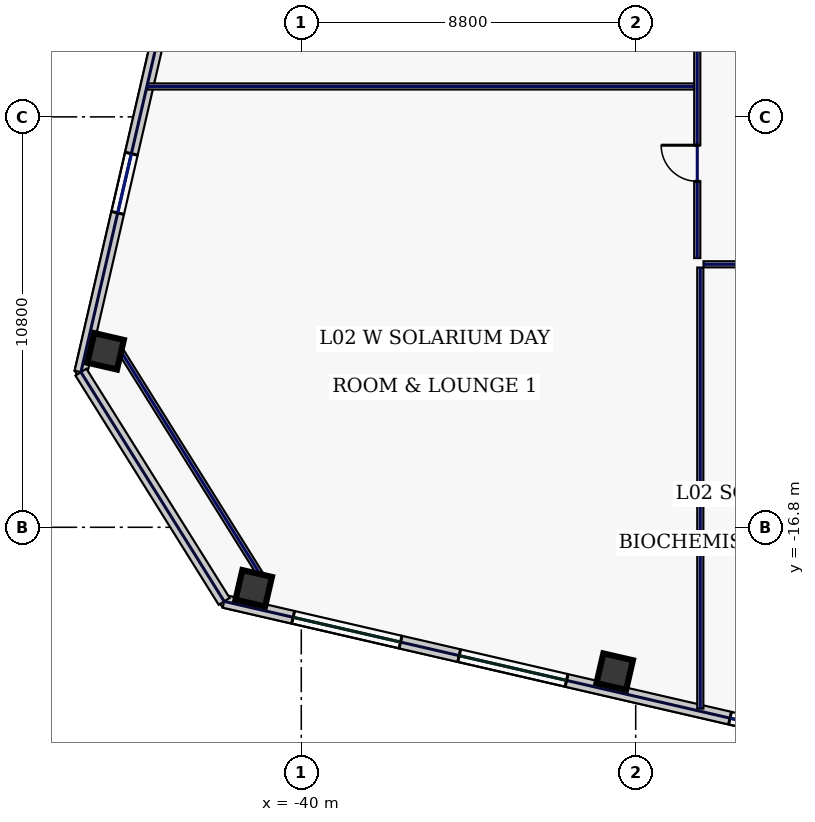
"""IFC4 building model, lengths in metres.
Left out: names, types, materials, properties, quantities, classifications, styles, units other than length and angle.
Written with IfcOpenShell. Run it as: python <this file> out.ifc"""

import sys

from ifc_helpers import new_model, si_unit, direction, frame, frame_2d, origin, origin_2d, place, context, subcontext, project, spatial, rectangle, hollow_rectangle, extrude, element, fill, save


model = new_model("IFC4")
c1 = context("Model", 3, precision=1e-05, world=origin(), true_north=direction((0.0, 1.0)))
c2 = subcontext(c1, "Body", "Model", "MODEL_VIEW")
j1 = project(units=[si_unit("LENGTHUNIT", "METRE"), si_unit("PLANEANGLEUNIT", "RADIAN")], contexts=[c1])
p1 = place(None, origin())
s1 = spatial("IfcSite", under=j1, at=p1, CompositionType="ELEMENT")
p2 = place(p1, origin())
s2 = spatial("IfcBuilding", under=s1, at=p2, CompositionType="ELEMENT")
p3 = place(p2, frame((0.0, 0.0, 13.4)))
s3 = spatial("IfcBuildingStorey", under=s2, at=p3, CompositionType="ELEMENT", Elevation=13.4)
for number, where, z_axis, x_axis in (
    (1, (-41.251, -18.406, 0.0), (0.0, 0.0, 1.0), (0.974, -0.225, 0.0)),
    (2, (-31.752, -20.599, 0.0), (0.0, 0.0, 1.0), (0.974, -0.225, 0.0)),
    (3, (-45.148, -12.169, 0.0), (0.0, 0.0, 1.0), (0.974, -0.225, 0.0)),
):
    element("IfcColumn", number, at=place(p3, frame(where, z_axis=z_axis, x_axis=x_axis)), inside=s3, PredefinedType="COLUMN", context=c2, shape_type="SweptSolid", body=[
        extrude(hollow_rectangle(XDim=0.8, YDim=0.8, WallThickness=0.036, at=origin_2d()), origin(), (0.0, 0.0, 1.0), 4.7),
    ])
p4 = place(p3, frame((-42.029, -18.75, 0.0), z_axis=(0.0, 0.0, 1.0), x_axis=(0.97436993772, -0.224951604723, 0.0)))
e4 = element("IfcWall", 4, at=p4, inside=s3, PredefinedType="STANDARD", context=c2, shape_type="SweptSolid", body=[
    extrude(rectangle(XDim=22.651, YDim=0.34, at=frame_2d((11.326, 0.0))), origin(), (0.0, 0.0, 1.0), 4.7),
])
p5 = place(p4, frame((1.862, 0.0, 0.85)))
e5 = element("IfcOpeningElement", 5, at=p5, cuts=e4, PredefinedType="OPENING", context=c2, shape_type="SweptSolid", body=[
    extrude(rectangle(XDim=2.9, YDim=2.3, at=frame_2d((1.45, 1.15))), frame((0.0, 0.18, 0.0), z_axis=(0.0, -1.0, 0.0), x_axis=(1.0, 0.0, 0.0)), (0.0, 0.0, 1.0), 0.36),
])
p6 = place(p4, frame((6.346, 0.0, 0.85)))
e6 = element("IfcOpeningElement", 6, at=p6, cuts=e4, PredefinedType="OPENING", context=c2, shape_type="SweptSolid", body=[
    extrude(rectangle(XDim=2.9, YDim=2.3, at=frame_2d((1.45, 1.15))), frame((0.0, 0.18, 0.0), z_axis=(0.0, -1.0, 0.0), x_axis=(1.0, 0.0, 0.0)), (0.0, 0.0, 1.0), 0.36),
])
p7 = place(p4, frame((13.661, 0.0, 0.85)))
e7 = element("IfcOpeningElement", 7, at=p7, cuts=e4, PredefinedType="OPENING", context=c2, shape_type="SweptSolid", body=[
    extrude(rectangle(XDim=0.85, YDim=1.85, at=frame_2d((0.425, 0.925))), frame((0.0, 0.18, 0.0), z_axis=(0.0, -1.0, 0.0), x_axis=(1.0, 0.0, 0.0)), (0.0, 0.0, 1.0), 0.36),
])
p8 = place(p4, frame((16.095, 0.0, 0.85)))
e8 = element("IfcOpeningElement", 8, at=p8, cuts=e4, PredefinedType="OPENING", context=c2, shape_type="SweptSolid", body=[
    extrude(rectangle(XDim=0.85, YDim=1.85, at=frame_2d((0.425, 0.925))), frame((0.0, 0.18, 0.0), z_axis=(0.0, -1.0, 0.0), x_axis=(1.0, 0.0, 0.0)), (0.0, 0.0, 1.0), 0.36),
])
p9 = place(p3, frame((-36.62, 27.037, 0.0), z_axis=(0.0, 0.0, 1.0), x_axis=(-0.224951280646, -0.974370012539, 0.0)))
e9 = element("IfcWall", 9, at=p9, inside=s3, PredefinedType="STANDARD", context=c2, shape_type="SweptSolid", body=[
    extrude(rectangle(XDim=40.8, YDim=0.34, at=frame_2d((20.4, 0.0))), origin(), (0.0, 0.0, 1.0), 4.7),
])
p10 = place(p9, frame((4.3, 0.0, 0.58)))
e10 = element("IfcOpeningElement", 10, at=p10, cuts=e9, PredefinedType="OPENING", context=c2, shape_type="SweptSolid", body=[
    extrude(rectangle(XDim=1.6, YDim=2.3, at=frame_2d((0.8, 1.15))), frame((0.0, 0.18, 0.0), z_axis=(0.0, -1.0, 0.0), x_axis=(1.0, 0.0, 0.0)), (0.0, 0.0, 1.0), 0.36),
])
p11 = place(p9, frame((14.5, 0.0, 0.58)))
e11 = element("IfcOpeningElement", 11, at=p11, cuts=e9, PredefinedType="OPENING", context=c2, shape_type="SweptSolid", body=[
    extrude(rectangle(XDim=1.6, YDim=2.3, at=frame_2d((0.8, 1.15))), frame((0.0, 0.18, 0.0), z_axis=(0.0, -1.0, 0.0), x_axis=(1.0, 0.0, 0.0)), (0.0, 0.0, 1.0), 0.36),
])
p12 = place(p9, frame((24.7, 0.0, 0.58)))
e12 = element("IfcOpeningElement", 12, at=p12, cuts=e9, PredefinedType="OPENING", context=c2, shape_type="SweptSolid", body=[
    extrude(rectangle(XDim=1.6, YDim=2.3, at=frame_2d((0.8, 1.15))), frame((0.0, 0.18, 0.0), z_axis=(0.0, -1.0, 0.0), x_axis=(1.0, 0.0, 0.0)), (0.0, 0.0, 1.0), 0.36),
])
p13 = place(p9, frame((34.9, 0.0, 0.58)))
e13 = element("IfcOpeningElement", 13, at=p13, cuts=e9, PredefinedType="OPENING", context=c2, shape_type="SweptSolid", body=[
    extrude(rectangle(XDim=1.6, YDim=2.3, at=frame_2d((0.8, 1.15))), frame((0.0, 0.18, 0.0), z_axis=(0.0, -1.0, 0.0), x_axis=(1.0, 0.0, 0.0)), (0.0, 0.0, 1.0), 0.36),
])
p14 = place(p3, frame((-45.798, -12.717, 0.0), z_axis=(0.0, 0.0, 1.0), x_axis=(0.529906387556, -0.848056142261, 0.0)))
e14 = element("IfcWall", 14, at=p14, inside=s3, PredefinedType="STANDARD", context=c2, shape_type="SweptSolid", body=[
    extrude(rectangle(XDim=7.114, YDim=0.34, at=frame_2d((3.557, 0.0))), origin(), (0.0, 0.0, 1.0), 4.7),
])
p15 = place(p3, frame((-44.86, -11.989, 0.0), z_axis=(0.0, 0.0, 1.0), x_axis=(0.52991239767, -0.848052386823, 0.0)))
e15 = element("IfcWall", 15, at=p15, inside=s3, PredefinedType="PARTITIONING", context=c2, shape_type="SweptSolid", body=[
    extrude(rectangle(XDim=7.354, YDim=0.16, at=frame_2d((3.677, 0.0))), origin(), (0.0, 0.0, 1.0), 4.7),
])
p16 = place(p3, frame((-29.58, -9.715, 0.0), z_axis=(0.0, 0.0, 1.0), x_axis=(0.0, 1.0, 0.0)))
e16 = element("IfcWall", 16, at=p16, inside=s3, PredefinedType="PARTITIONING", context=c2, shape_type="SweptSolid", body=[
    extrude(rectangle(XDim=19.43, YDim=0.16, at=frame_2d((9.715, 0.0))), origin(), (0.0, 0.0, 1.0), 4.7),
])
p17 = place(p16, frame((2.019, 0.0, 0.0)))
e17 = element("IfcOpeningElement", 17, at=p17, cuts=e16, PredefinedType="OPENING", context=c2, shape_type="SweptSolid", body=[
    extrude(rectangle(XDim=0.95, YDim=2.2, at=frame_2d((0.475, 1.1))), frame((0.0, 0.09, 0.0), z_axis=(0.0, -1.0, 0.0), x_axis=(1.0, 0.0, 0.0)), (0.0, 0.0, 1.0), 0.18),
])
p18 = place(p16, frame((6.725, 0.0, 0.0)))
e18 = element("IfcOpeningElement", 18, at=p18, cuts=e16, PredefinedType="OPENING", context=c2, shape_type="SweptSolid", body=[
    extrude(rectangle(XDim=0.95, YDim=2.2, at=frame_2d((0.475, 1.1))), frame((0.0, 0.09, 0.0), z_axis=(0.0, -1.0, 0.0), x_axis=(1.0, 0.0, 0.0)), (0.0, 0.0, 1.0), 0.18),
])
p19 = place(p16, frame((11.925, 0.0, 0.0)))
e19 = element("IfcOpeningElement", 19, at=p19, cuts=e16, PredefinedType="OPENING", context=c2, shape_type="SweptSolid", body=[
    extrude(rectangle(XDim=0.95, YDim=2.2, at=frame_2d((0.475, 1.1))), frame((0.0, 0.09, 0.0), z_axis=(0.0, -1.0, 0.0), x_axis=(1.0, 0.0, 0.0)), (0.0, 0.0, 1.0), 0.18),
])
p20 = place(p16, frame((16.631, 0.0, 0.0)))
e20 = element("IfcOpeningElement", 20, at=p20, cuts=e16, PredefinedType="OPENING", context=c2, shape_type="SweptSolid", body=[
    extrude(rectangle(XDim=0.95, YDim=2.2, at=frame_2d((0.475, 1.1))), frame((0.0, 0.09, 0.0), z_axis=(0.0, -1.0, 0.0), x_axis=(1.0, 0.0, 0.0)), (0.0, 0.0, 1.0), 0.18),
])
p21 = place(p3, frame((-6.915, -9.88, 0.0), z_axis=(0.0, 0.0, 1.0), x_axis=(-1.0, 0.0, 0.0)))
e21 = element("IfcWall", 21, at=p21, inside=s3, PredefinedType="PARTITIONING", context=c2, shape_type="SweptSolid", body=[
    extrude(rectangle(XDim=22.5, YDim=0.16, at=frame_2d((11.25, 0.0))), origin(), (0.0, 0.0, 1.0), 4.7),
])
p22 = place(p21, frame((19.676, 0.0, 0.0)))
e22 = element("IfcOpeningElement", 22, at=p22, cuts=e21, PredefinedType="OPENING", context=c2, shape_type="SweptSolid", body=[
    extrude(rectangle(XDim=0.95, YDim=2.2, at=frame_2d((0.475, 1.1))), frame((0.0, 0.09, 0.0), z_axis=(0.0, -1.0, 0.0), x_axis=(1.0, 0.0, 0.0)), (0.0, 0.0, 1.0), 0.18),
])
p23 = place(p21, frame((14.22, 0.0, 0.0)))
e23 = element("IfcOpeningElement", 23, at=p23, cuts=e21, PredefinedType="OPENING", context=c2, shape_type="SweptSolid", body=[
    extrude(rectangle(XDim=0.95, YDim=2.2, at=frame_2d((0.475, 1.1))), frame((0.0, 0.09, 0.0), z_axis=(0.0, -1.0, 0.0), x_axis=(1.0, 0.0, 0.0)), (0.0, 0.0, 1.0), 0.18),
])
p24 = place(p21, frame((7.495, 0.0, 0.0)))
e24 = element("IfcOpeningElement", 24, at=p24, cuts=e21, PredefinedType="OPENING", context=c2, shape_type="SweptSolid", body=[
    extrude(rectangle(XDim=0.95, YDim=2.2, at=frame_2d((0.475, 1.1))), frame((0.0, 0.09, 0.0), z_axis=(0.0, -1.0, 0.0), x_axis=(1.0, 0.0, 0.0)), (0.0, 0.0, 1.0), 0.18),
])
p25 = place(p3, frame((-29.5, -21.571, 0.0), z_axis=(0.0, 0.0, 1.0), x_axis=(0.0, 1.0, 0.0)))
e25 = element("IfcWall", 25, at=p25, inside=s3, PredefinedType="PARTITIONING", context=c2, shape_type="SweptSolid", body=[
    extrude(rectangle(XDim=11.605, YDim=0.16, at=frame_2d((5.803, 0.0))), origin(), (0.0, 0.0, 1.0), 4.7),
])
p26 = place(p3, frame((-44.042, -5.2, 0.0), z_axis=(0.0, 0.0, 1.0), x_axis=(1.0, 0.0, 0.0)))
e26 = element("IfcWall", 26, at=p26, inside=s3, PredefinedType="PARTITIONING", context=c2, shape_type="SweptSolid", body=[
    extrude(rectangle(XDim=14.377, YDim=0.16, at=frame_2d((7.188, 0.0))), origin(), (0.0, 0.0, 1.0), 4.7),
])
p27 = place(p5, origin())
e27 = element("IfcWindow", 27, at=p27, inside=s3, PartitioningType="SINGLE_PANEL", PredefinedType="WINDOW", context=c2, shape_type="SweptSolid", body=[
    extrude(rectangle(XDim=2.9, YDim=2.3, at=frame_2d((1.45, 1.15))), frame((0.0, 0.03, 0.0), z_axis=(0.0, -1.0, 0.0), x_axis=(1.0, 0.0, 0.0)), (0.0, 0.0, 1.0), 0.06),
])
fill(e5, e27)
p28 = place(p6, origin())
e28 = element("IfcWindow", 28, at=p28, inside=s3, PartitioningType="SINGLE_PANEL", PredefinedType="WINDOW", context=c2, shape_type="SweptSolid", body=[
    extrude(rectangle(XDim=2.9, YDim=2.3, at=frame_2d((1.45, 1.15))), frame((0.0, 0.03, 0.0), z_axis=(0.0, -1.0, 0.0), x_axis=(1.0, 0.0, 0.0)), (0.0, 0.0, 1.0), 0.06),
])
fill(e6, e28)
p29 = place(p7, origin())
e29 = element("IfcWindow", 29, at=p29, inside=s3, PartitioningType="SINGLE_PANEL", PredefinedType="WINDOW", context=c2, shape_type="SweptSolid", body=[
    extrude(rectangle(XDim=0.85, YDim=1.85, at=frame_2d((0.425, 0.925))), frame((0.0, 0.03, 0.0), z_axis=(0.0, -1.0, 0.0), x_axis=(1.0, 0.0, 0.0)), (0.0, 0.0, 1.0), 0.06),
])
fill(e7, e29)
p30 = place(p13, origin())
e30 = element("IfcWindow", 30, at=p30, inside=s3, PartitioningType="SINGLE_PANEL", PredefinedType="WINDOW", context=c2, shape_type="SweptSolid", body=[
    extrude(rectangle(XDim=1.6, YDim=2.3, at=frame_2d((0.8, 1.15))), frame((0.0, 0.03, 0.0), z_axis=(0.0, -1.0, 0.0), x_axis=(1.0, 0.0, 0.0)), (0.0, 0.0, 1.0), 0.06),
])
fill(e13, e30)
p31 = place(p17, origin())
e31 = element("IfcDoor", 31, at=p31, inside=s3, OperationType="SINGLE_SWING_RIGHT", PredefinedType="DOOR", context=c2, shape_type="SweptSolid", body=[
    extrude(rectangle(XDim=0.95, YDim=2.2, at=frame_2d((0.475, 1.1))), frame((0.0, 0.025, 0.0), z_axis=(0.0, -1.0, 0.0), x_axis=(1.0, 0.0, 0.0)), (0.0, 0.0, 1.0), 0.05),
])
fill(e17, e31)
save(model, sys.argv[1])
